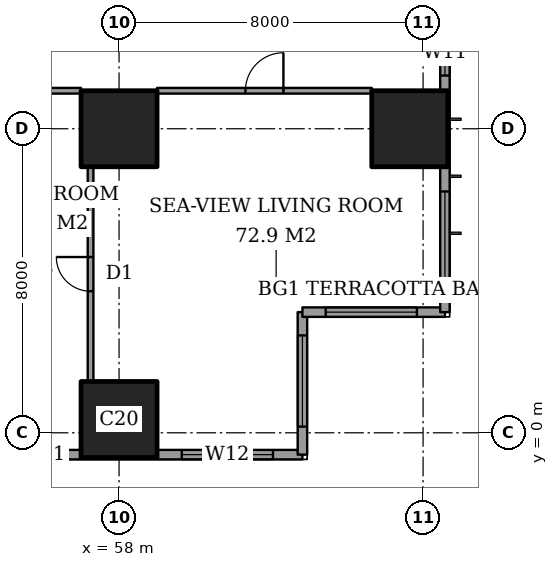
"""IFC4 building model, lengths in metres.
Left out: names, types, materials, properties, quantities, classifications, styles, units other than length and angle.
Written with IfcOpenShell. Run it as: python <this file> out.ifc"""

import sys

from ifc_helpers import new_model, si_unit, direction, frame, frame_2d, origin, origin_2d, place, context, subcontext, project, spatial, rectangle, extrude, element, fill, save


model = new_model("IFC4")
c1 = context("Model", 3, precision=1e-05, world=origin(), true_north=direction((0.0, 1.0)))
c2 = subcontext(c1, "Body", "Model", "MODEL_VIEW")
j1 = project(units=[si_unit("LENGTHUNIT", "METRE"), si_unit("PLANEANGLEUNIT", "RADIAN")], contexts=[c1])
p1 = place(None, origin())
s1 = spatial("IfcSite", under=j1, at=p1, CompositionType="ELEMENT")
p2 = place(p1, origin())
s2 = spatial("IfcBuilding", under=s1, at=p2, CompositionType="ELEMENT")
p3 = place(p2, frame((0.0, 0.0, 168.2)))
s3 = spatial("IfcBuildingStorey", under=s2, at=p3, CompositionType="ELEMENT", Elevation=168.2)
for number, where, z_axis, x_axis in (
    (1, (58.0, 0.35, 0.0), (0.0, 0.0, 1.0), (1.0, 0.0, 0.0)),
    (2, (58.0, 8.0, 0.0), (0.0, 0.0, 1.0), (1.0, 0.0, 0.0)),
    (3, (65.65, 8.0, 0.0), (0.0, 0.0, 1.0), (1.0, 0.0, 0.0)),
):
    element("IfcColumn", number, at=place(p3, frame(where, z_axis=z_axis, x_axis=x_axis)), inside=s3, PredefinedType="COLUMN", context=c2, shape_type="SweptSolid", body=[
        extrude(rectangle(XDim=2.0, YDim=2.0, at=origin_2d()), origin(), (0.0, 0.0, 1.0), 3.6),
    ])
p4 = place(p3, frame((41.425, -0.575, 0.0), z_axis=(0.0, 0.0, 1.0), x_axis=(1.0, 0.0, 0.0)))
e4 = element("IfcWall", 4, at=p4, inside=s3, PredefinedType="SOLIDWALL", context=c2, shape_type="SweptSolid", body=[
    extrude(rectangle(XDim=21.4, YDim=0.25, at=frame_2d((10.7, 0.0))), origin(), (0.0, 0.0, 1.0), 3.6),
])
p5 = place(p4, frame((2.65, 0.0, 0.4)))
e5 = element("IfcOpeningElement", 5, at=p5, cuts=e4, PredefinedType="OPENING", context=c2, shape_type="SweptSolid", body=[
    extrude(rectangle(XDim=1.2, YDim=2.2, at=frame_2d((0.6, 1.1))), frame((0.0, 0.135, 0.0), z_axis=(0.0, -1.0, 0.0), x_axis=(1.0, 0.0, 0.0)), (0.0, 0.0, 1.0), 0.27),
])
p6 = place(p4, frame((5.475, 0.0, 0.4)))
e6 = element("IfcOpeningElement", 6, at=p6, cuts=e4, PredefinedType="OPENING", context=c2, shape_type="SweptSolid", body=[
    extrude(rectangle(XDim=1.2, YDim=2.2, at=frame_2d((0.6, 1.1))), frame((0.0, 0.135, 0.0), z_axis=(0.0, -1.0, 0.0), x_axis=(1.0, 0.0, 0.0)), (0.0, 0.0, 1.0), 0.27),
])
p7 = place(p4, frame((10.375, 0.0, 0.4)))
e7 = element("IfcOpeningElement", 7, at=p7, cuts=e4, PredefinedType="OPENING", context=c2, shape_type="SweptSolid", body=[
    extrude(rectangle(XDim=2.4, YDim=2.2, at=frame_2d((1.2, 1.1))), frame((0.0, 0.135, 0.0), z_axis=(0.0, -1.0, 0.0), x_axis=(1.0, 0.0, 0.0)), (0.0, 0.0, 1.0), 0.27),
])
p8 = place(p4, frame((13.975, 0.0, 0.4)))
e8 = element("IfcOpeningElement", 8, at=p8, cuts=e4, PredefinedType="OPENING", context=c2, shape_type="SweptSolid", body=[
    extrude(rectangle(XDim=1.2, YDim=2.2, at=frame_2d((0.6, 1.1))), frame((0.0, 0.135, 0.0), z_axis=(0.0, -1.0, 0.0), x_axis=(1.0, 0.0, 0.0)), (0.0, 0.0, 1.0), 0.27),
])
p9 = place(p4, frame((18.225, 0.0, 0.4)))
e9 = element("IfcOpeningElement", 9, at=p9, cuts=e4, PredefinedType="OPENING", context=c2, shape_type="SweptSolid", body=[
    extrude(rectangle(XDim=2.4, YDim=2.2, at=frame_2d((1.2, 1.1))), frame((0.0, 0.135, 0.0), z_axis=(0.0, -1.0, 0.0), x_axis=(1.0, 0.0, 0.0)), (0.0, 0.0, 1.0), 0.27),
])
p10 = place(p3, frame((62.825, -0.575, 0.0), z_axis=(0.0, 0.0, 1.0), x_axis=(0.0, 1.0, 0.0)))
e10 = element("IfcWall", 10, at=p10, inside=s3, PredefinedType="SOLIDWALL", context=c2, shape_type="SweptSolid", body=[
    extrude(rectangle(XDim=3.75, YDim=0.25, at=frame_2d((1.875, 0.0))), origin(), (0.0, 0.0, 1.0), 3.6),
])
p11 = place(p10, frame((0.738, 0.0, 0.4)))
e11 = element("IfcOpeningElement", 11, at=p11, cuts=e10, PredefinedType="OPENING", context=c2, shape_type="SweptSolid", body=[
    extrude(rectangle(XDim=2.4, YDim=2.2, at=frame_2d((1.2, 1.1))), frame((0.0, 0.135, 0.0), z_axis=(0.0, -1.0, 0.0), x_axis=(1.0, 0.0, 0.0)), (0.0, 0.0, 1.0), 0.27),
])
p12 = place(p3, frame((62.825, 3.175, 0.0), z_axis=(0.0, 0.0, 1.0), x_axis=(1.0, 0.0, 0.0)))
e12 = element("IfcWall", 12, at=p12, inside=s3, PredefinedType="SOLIDWALL", context=c2, shape_type="SweptSolid", body=[
    extrude(rectangle(XDim=3.75, YDim=0.25, at=frame_2d((1.875, 0.0))), origin(), (0.0, 0.0, 1.0), 3.6),
])
p13 = place(p12, frame((0.613, 0.0, 0.4)))
e13 = element("IfcOpeningElement", 13, at=p13, cuts=e12, PredefinedType="OPENING", context=c2, shape_type="SweptSolid", body=[
    extrude(rectangle(XDim=2.4, YDim=2.2, at=frame_2d((1.2, 1.1))), frame((0.0, 0.135, 0.0), z_axis=(0.0, -1.0, 0.0), x_axis=(1.0, 0.0, 0.0)), (0.0, 0.0, 1.0), 0.27),
])
p14 = place(p3, frame((66.575, 3.175, 0.0), z_axis=(0.0, 0.0, 1.0), x_axis=(0.0, 1.0, 0.0)))
e14 = element("IfcWall", 14, at=p14, inside=s3, PredefinedType="SOLIDWALL", context=c2, shape_type="SweptSolid", body=[
    extrude(rectangle(XDim=41.65, YDim=0.25, at=frame_2d((20.825, 0.0))), origin(), (0.0, 0.0, 1.0), 3.6),
])
p15 = place(p14, frame((0.775, 0.0, 0.4)))
e15 = element("IfcOpeningElement", 15, at=p15, cuts=e14, PredefinedType="OPENING", context=c2, shape_type="SweptSolid", body=[
    extrude(rectangle(XDim=2.4, YDim=2.2, at=frame_2d((1.2, 1.1))), frame((0.0, 0.135, 0.0), z_axis=(0.0, -1.0, 0.0), x_axis=(1.0, 0.0, 0.0)), (0.0, 0.0, 1.0), 0.27),
])
p16 = place(p14, frame((6.225, 0.0, 0.4)))
e16 = element("IfcOpeningElement", 16, at=p16, cuts=e14, PredefinedType="OPENING", context=c2, shape_type="SweptSolid", body=[
    extrude(rectangle(XDim=1.2, YDim=2.2, at=frame_2d((0.6, 1.1))), frame((0.0, 0.135, 0.0), z_axis=(0.0, -1.0, 0.0), x_axis=(1.0, 0.0, 0.0)), (0.0, 0.0, 1.0), 0.27),
])
p17 = place(p14, frame((8.475, 0.0, 0.4)))
e17 = element("IfcOpeningElement", 17, at=p17, cuts=e14, PredefinedType="OPENING", context=c2, shape_type="SweptSolid", body=[
    extrude(rectangle(XDim=2.4, YDim=2.2, at=frame_2d((1.2, 1.1))), frame((0.0, 0.135, 0.0), z_axis=(0.0, -1.0, 0.0), x_axis=(1.0, 0.0, 0.0)), (0.0, 0.0, 1.0), 0.27),
])
p18 = place(p14, frame((15.775, 0.0, 0.4)))
e18 = element("IfcOpeningElement", 18, at=p18, cuts=e14, PredefinedType="OPENING", context=c2, shape_type="SweptSolid", body=[
    extrude(rectangle(XDim=2.4, YDim=2.2, at=frame_2d((1.2, 1.1))), frame((0.0, 0.135, 0.0), z_axis=(0.0, -1.0, 0.0), x_axis=(1.0, 0.0, 0.0)), (0.0, 0.0, 1.0), 0.27),
])
p19 = place(p14, frame((23.475, 0.0, 0.4)))
e19 = element("IfcOpeningElement", 19, at=p19, cuts=e14, PredefinedType="OPENING", context=c2, shape_type="SweptSolid", body=[
    extrude(rectangle(XDim=2.4, YDim=2.2, at=frame_2d((1.2, 1.1))), frame((0.0, 0.135, 0.0), z_axis=(0.0, -1.0, 0.0), x_axis=(1.0, 0.0, 0.0)), (0.0, 0.0, 1.0), 0.27),
])
p20 = place(p14, frame((30.975, 0.0, 0.4)))
e20 = element("IfcOpeningElement", 20, at=p20, cuts=e14, PredefinedType="OPENING", context=c2, shape_type="SweptSolid", body=[
    extrude(rectangle(XDim=2.4, YDim=2.2, at=frame_2d((1.2, 1.1))), frame((0.0, 0.135, 0.0), z_axis=(0.0, -1.0, 0.0), x_axis=(1.0, 0.0, 0.0)), (0.0, 0.0, 1.0), 0.27),
])
p21 = place(p14, frame((34.5, 0.0, 0.4)))
e21 = element("IfcOpeningElement", 21, at=p21, cuts=e14, PredefinedType="OPENING", context=c2, shape_type="SweptSolid", body=[
    extrude(rectangle(XDim=1.2, YDim=2.2, at=frame_2d((0.6, 1.1))), frame((0.0, 0.135, 0.0), z_axis=(0.0, -1.0, 0.0), x_axis=(1.0, 0.0, 0.0)), (0.0, 0.0, 1.0), 0.27),
])
p22 = place(p14, frame((38.475, 0.0, 0.4)))
e22 = element("IfcOpeningElement", 22, at=p22, cuts=e14, PredefinedType="OPENING", context=c2, shape_type="SweptSolid", body=[
    extrude(rectangle(XDim=2.4, YDim=2.2, at=frame_2d((1.2, 1.1))), frame((0.0, 0.135, 0.0), z_axis=(0.0, -1.0, 0.0), x_axis=(1.0, 0.0, 0.0)), (0.0, 0.0, 1.0), 0.27),
])
p23 = place(p3, frame((51.2, 9.0, 0.0), z_axis=(0.0, 0.0, 1.0), x_axis=(1.0, 0.0, 0.0)))
e23 = element("IfcWall", 23, at=p23, inside=s3, PredefinedType="PARTITIONING", context=c2, shape_type="SweptSolid", body=[
    extrude(rectangle(XDim=5.8, YDim=0.15, at=frame_2d((2.9, 0.0))), origin(), (0.0, 0.0, 1.0), 3.25),
])
p24 = place(p23, frame((1.4, 0.0, 0.0)))
e24 = element("IfcOpeningElement", 24, at=p24, cuts=e23, PredefinedType="OPENING", context=c2, shape_type="SweptSolid", body=[
    extrude(rectangle(XDim=1.0, YDim=2.1, at=frame_2d((0.5, 1.05))), frame((0.0, 0.085, 0.0), z_axis=(0.0, -1.0, 0.0), x_axis=(1.0, 0.0, 0.0)), (0.0, 0.0, 1.0), 0.17),
])
p25 = place(p3, frame((59.0, 9.0, 0.0), z_axis=(0.0, 0.0, 1.0), x_axis=(1.0, 0.0, 0.0)))
e25 = element("IfcWall", 25, at=p25, inside=s3, PredefinedType="PARTITIONING", context=c2, shape_type="SweptSolid", body=[
    extrude(rectangle(XDim=5.65, YDim=0.15, at=frame_2d((2.825, 0.0))), origin(), (0.0, 0.0, 1.0), 3.25),
])
p26 = place(p25, frame((2.325, 0.0, 0.0)))
e26 = element("IfcOpeningElement", 26, at=p26, cuts=e25, PredefinedType="OPENING", context=c2, shape_type="SweptSolid", body=[
    extrude(rectangle(XDim=1.0, YDim=2.1, at=frame_2d((0.5, 1.05))), frame((0.0, 0.085, 0.0), z_axis=(0.0, -1.0, 0.0), x_axis=(1.0, 0.0, 0.0)), (0.0, 0.0, 1.0), 0.17),
])
p27 = place(p3, frame((57.25, 1.35, 0.0), z_axis=(0.0, 0.0, 1.0), x_axis=(0.0, 1.0, 0.0)))
e27 = element("IfcWall", 27, at=p27, inside=s3, PredefinedType="PARTITIONING", context=c2, shape_type="SweptSolid", body=[
    extrude(rectangle(XDim=5.65, YDim=0.15, at=frame_2d((2.825, 0.0))), origin(), (0.0, 0.0, 1.0), 3.25),
])
p28 = place(p27, frame((2.375, 0.0, 0.0)))
e28 = element("IfcOpeningElement", 28, at=p28, cuts=e27, PredefinedType="OPENING", context=c2, shape_type="SweptSolid", body=[
    extrude(rectangle(XDim=0.9, YDim=2.1, at=frame_2d((0.45, 1.05))), frame((0.0, 0.085, 0.0), z_axis=(0.0, -1.0, 0.0), x_axis=(1.0, 0.0, 0.0)), (0.0, 0.0, 1.0), 0.17),
])
p29 = place(p8, origin())
e29 = element("IfcWindow", 29, at=p29, inside=s3, PartitioningType="SINGLE_PANEL", PredefinedType="WINDOW", context=c2, shape_type="SweptSolid", body=[
    extrude(rectangle(XDim=1.2, YDim=2.2, at=frame_2d((0.6, 1.1))), frame((0.0, 0.03, 0.0), z_axis=(0.0, -1.0, 0.0), x_axis=(1.0, 0.0, 0.0)), (0.0, 0.0, 1.0), 0.06),
])
fill(e8, e29)
p30 = place(p9, origin())
e30 = element("IfcWindow", 30, at=p30, inside=s3, PartitioningType="SINGLE_PANEL", PredefinedType="WINDOW", context=c2, shape_type="SweptSolid", body=[
    extrude(rectangle(XDim=2.4, YDim=2.2, at=frame_2d((1.2, 1.1))), frame((0.0, 0.03, 0.0), z_axis=(0.0, -1.0, 0.0), x_axis=(1.0, 0.0, 0.0)), (0.0, 0.0, 1.0), 0.06),
])
fill(e9, e30)
p31 = place(p11, origin())
e31 = element("IfcWindow", 31, at=p31, inside=s3, PartitioningType="SINGLE_PANEL", PredefinedType="WINDOW", context=c2, shape_type="SweptSolid", body=[
    extrude(rectangle(XDim=2.4, YDim=2.2, at=frame_2d((1.2, 1.1))), frame((0.0, 0.03, 0.0), z_axis=(0.0, -1.0, 0.0), x_axis=(1.0, 0.0, 0.0)), (0.0, 0.0, 1.0), 0.06),
])
fill(e11, e31)
p32 = place(p13, origin())
e32 = element("IfcWindow", 32, at=p32, inside=s3, PartitioningType="SINGLE_PANEL", PredefinedType="WINDOW", context=c2, shape_type="SweptSolid", body=[
    extrude(rectangle(XDim=2.4, YDim=2.2, at=frame_2d((1.2, 1.1))), frame((0.0, 0.03, 0.0), z_axis=(0.0, -1.0, 0.0), x_axis=(1.0, 0.0, 0.0)), (0.0, 0.0, 1.0), 0.06),
])
fill(e13, e32)
p33 = place(p15, origin())
e33 = element("IfcWindow", 33, at=p33, inside=s3, PartitioningType="SINGLE_PANEL", PredefinedType="WINDOW", context=c2, shape_type="SweptSolid", body=[
    extrude(rectangle(XDim=2.4, YDim=2.2, at=frame_2d((1.2, 1.1))), frame((0.0, 0.03, 0.0), z_axis=(0.0, -1.0, 0.0), x_axis=(1.0, 0.0, 0.0)), (0.0, 0.0, 1.0), 0.06),
])
fill(e15, e33)
p34 = place(p16, origin())
e34 = element("IfcWindow", 34, at=p34, inside=s3, PartitioningType="SINGLE_PANEL", PredefinedType="WINDOW", context=c2, shape_type="SweptSolid", body=[
    extrude(rectangle(XDim=1.2, YDim=2.2, at=frame_2d((0.6, 1.1))), frame((0.0, 0.03, 0.0), z_axis=(0.0, -1.0, 0.0), x_axis=(1.0, 0.0, 0.0)), (0.0, 0.0, 1.0), 0.06),
])
fill(e16, e34)
p35 = place(p26, origin())
e35 = element("IfcDoor", 35, at=p35, inside=s3, OperationType="SINGLE_SWING_LEFT", PredefinedType="DOOR", context=c2, shape_type="SweptSolid", body=[
    extrude(rectangle(XDim=1.0, YDim=2.1, at=frame_2d((0.5, 1.05))), frame((0.0, 0.025, 0.0), z_axis=(0.0, -1.0, 0.0), x_axis=(1.0, 0.0, 0.0)), (0.0, 0.0, 1.0), 0.05),
])
fill(e26, e35)
p36 = place(p28, origin())
e36 = element("IfcDoor", 36, at=p36, inside=s3, OperationType="SINGLE_SWING_LEFT", PredefinedType="DOOR", context=c2, shape_type="SweptSolid", body=[
    extrude(rectangle(XDim=0.9, YDim=2.1, at=frame_2d((0.45, 1.05))), frame((0.0, 0.025, 0.0), z_axis=(0.0, -1.0, 0.0), x_axis=(1.0, 0.0, 0.0)), (0.0, 0.0, 1.0), 0.05),
])
fill(e28, e36)
save(model, sys.argv[1])
